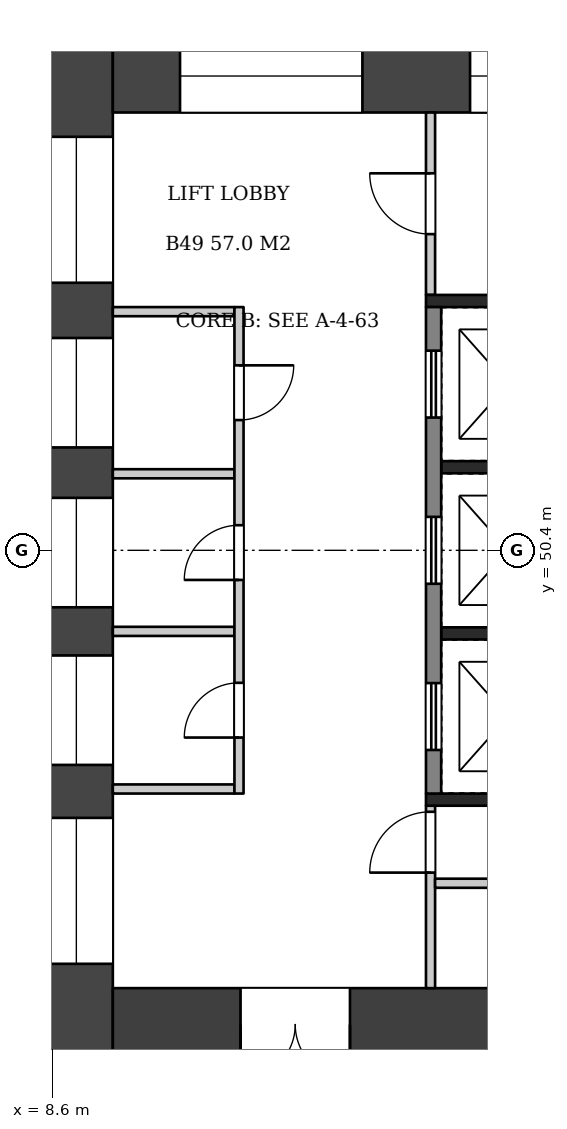
"""IFC4 building model, lengths in metres.
Left out: names, types, materials, properties, quantities, classifications, styles, units other than length and angle.
Written with IfcOpenShell. Run it as: python <this file> out.ifc"""

import sys

from ifc_helpers import new_model, si_unit, direction, frame, frame_2d, origin, place, context, subcontext, project, spatial, rectangle, extrude, element, fill, save


model = new_model("IFC4")
c1 = context("Model", 3, precision=1e-05, world=origin(), true_north=direction((0.0, 1.0)))
c2 = subcontext(c1, "Body", "Model", "MODEL_VIEW")
j1 = project(units=[si_unit("LENGTHUNIT", "METRE"), si_unit("PLANEANGLEUNIT", "RADIAN")], contexts=[c1])
p1 = place(None, origin())
s1 = spatial("IfcSite", under=j1, at=p1, CompositionType="ELEMENT")
p2 = place(p1, origin())
s2 = spatial("IfcBuilding", under=s1, at=p2, CompositionType="ELEMENT")
p3 = place(p2, frame((0.0, 0.0, 189.7)))
s3 = spatial("IfcBuildingStorey", under=s2, at=p3, CompositionType="ELEMENT", Elevation=189.7)
p4 = place(p3, frame((9.0, 58.8, 0.0), z_axis=(0.0, 0.0, 1.0), x_axis=(0.0, -1.0, 0.0)))
e1 = element("IfcWall", 1, at=p4, inside=s3, PredefinedType="SHEAR", context=c2, shape_type="SweptSolid", body=[
    extrude(rectangle(XDim=16.8, YDim=1.2, at=frame_2d((8.4, 0.0))), origin(), (0.0, 0.0, 1.0), 3.22),
])
p5 = place(p4, frame((1.6, 0.0, 0.6)))
e2 = element("IfcOpeningElement", 2, at=p5, cuts=e1, PredefinedType="OPENING", context=c2, shape_type="SweptSolid", body=[
    extrude(rectangle(XDim=2.4, YDim=2.1, at=frame_2d((1.2, 1.05))), frame((0.0, 0.61, 0.0), z_axis=(0.0, -1.0, 0.0), x_axis=(1.0, 0.0, 0.0)), (0.0, 0.0, 1.0), 1.22),
])
p6 = place(p4, frame((4.908, 0.0, 1.6)))
e3 = element("IfcOpeningElement", 3, at=p6, cuts=e1, PredefinedType="OPENING", context=c2, shape_type="SweptSolid", body=[
    extrude(rectangle(XDim=1.8, YDim=1.2, at=frame_2d((0.9, 0.6))), frame((0.0, 0.61, 0.0), z_axis=(0.0, -1.0, 0.0), x_axis=(1.0, 0.0, 0.0)), (0.0, 0.0, 1.0), 1.22),
])
p7 = place(p4, frame((7.537, 0.0, 1.6)))
e4 = element("IfcOpeningElement", 4, at=p7, cuts=e1, PredefinedType="OPENING", context=c2, shape_type="SweptSolid", body=[
    extrude(rectangle(XDim=1.8, YDim=1.2, at=frame_2d((0.9, 0.6))), frame((0.0, 0.61, 0.0), z_axis=(0.0, -1.0, 0.0), x_axis=(1.0, 0.0, 0.0)), (0.0, 0.0, 1.0), 1.22),
])
p8 = place(p4, frame((10.129, 0.0, 1.6)))
e5 = element("IfcOpeningElement", 5, at=p8, cuts=e1, PredefinedType="OPENING", context=c2, shape_type="SweptSolid", body=[
    extrude(rectangle(XDim=1.8, YDim=1.2, at=frame_2d((0.9, 0.6))), frame((0.0, 0.61, 0.0), z_axis=(0.0, -1.0, 0.0), x_axis=(1.0, 0.0, 0.0)), (0.0, 0.0, 1.0), 1.22),
])
p9 = place(p4, frame((12.8, 0.0, 0.6)))
e6 = element("IfcOpeningElement", 6, at=p9, cuts=e1, PredefinedType="OPENING", context=c2, shape_type="SweptSolid", body=[
    extrude(rectangle(XDim=2.4, YDim=2.1, at=frame_2d((1.2, 1.05))), frame((0.0, 0.61, 0.0), z_axis=(0.0, -1.0, 0.0), x_axis=(1.0, 0.0, 0.0)), (0.0, 0.0, 1.0), 1.22),
])
p10 = place(p3, frame((9.6, 58.2, 0.0), z_axis=(0.0, 0.0, 1.0), x_axis=(1.0, 0.0, 0.0)))
e7 = element("IfcWall", 7, at=p10, inside=s3, PredefinedType="SHEAR", context=c2, shape_type="SweptSolid", body=[
    extrude(rectangle(XDim=14.4, YDim=1.2, at=frame_2d((7.2, 0.0))), origin(), (0.0, 0.0, 1.0), 3.22),
])
p11 = place(p10, frame((1.105, 0.0, 0.6)))
e8 = element("IfcOpeningElement", 8, at=p11, cuts=e7, PredefinedType="OPENING", context=c2, shape_type="SweptSolid", body=[
    extrude(rectangle(XDim=3.0, YDim=2.1, at=frame_2d((1.5, 1.05))), frame((0.0, 0.61, 0.0), z_axis=(0.0, -1.0, 0.0), x_axis=(1.0, 0.0, 0.0)), (0.0, 0.0, 1.0), 1.22),
])
p12 = place(p10, frame((5.875, 0.0, 0.6)))
e9 = element("IfcOpeningElement", 9, at=p12, cuts=e7, PredefinedType="OPENING", context=c2, shape_type="SweptSolid", body=[
    extrude(rectangle(XDim=2.4, YDim=2.1, at=frame_2d((1.2, 1.05))), frame((0.0, 0.61, 0.0), z_axis=(0.0, -1.0, 0.0), x_axis=(1.0, 0.0, 0.0)), (0.0, 0.0, 1.0), 1.22),
])
p13 = place(p10, frame((9.993, 0.0, 0.5)))
e10 = element("IfcOpeningElement", 10, at=p13, cuts=e7, PredefinedType="OPENING", context=c2, shape_type="SweptSolid", body=[
    extrude(rectangle(XDim=1.2, YDim=2.4, at=frame_2d((0.6, 1.2))), frame((0.0, 0.61, 0.0), z_axis=(0.0, -1.0, 0.0), x_axis=(1.0, 0.0, 0.0)), (0.0, 0.0, 1.0), 1.22),
])
p14 = place(p10, frame((12.197, 0.0, 0.5)))
e11 = element("IfcOpeningElement", 11, at=p14, cuts=e7, PredefinedType="OPENING", context=c2, shape_type="SweptSolid", body=[
    extrude(rectangle(XDim=1.2, YDim=2.4, at=frame_2d((0.6, 1.2))), frame((0.0, 0.61, 0.0), z_axis=(0.0, -1.0, 0.0), x_axis=(1.0, 0.0, 0.0)), (0.0, 0.0, 1.0), 1.22),
])
p15 = place(p3, frame((9.6, 42.6, 0.0), z_axis=(0.0, 0.0, 1.0), x_axis=(1.0, 0.0, 0.0)))
e12 = element("IfcWall", 12, at=p15, inside=s3, PredefinedType="SHEAR", context=c2, shape_type="SweptSolid", body=[
    extrude(rectangle(XDim=14.4, YDim=1.2, at=frame_2d((7.2, 0.0))), origin(), (0.0, 0.0, 1.0), 3.22),
])
p16 = place(p15, frame((2.1, 0.0, 0.0)))
e13 = element("IfcOpeningElement", 13, at=p16, cuts=e12, PredefinedType="OPENING", context=c2, shape_type="SweptSolid", body=[
    extrude(rectangle(XDim=1.8, YDim=2.1, at=frame_2d((0.9, 1.05))), frame((0.0, 0.61, 0.0), z_axis=(0.0, -1.0, 0.0), x_axis=(1.0, 0.0, 0.0)), (0.0, 0.0, 1.0), 1.22),
])
for number, where, z_axis, x_axis in (
    (14, (9.6, 54.325, 0.0), (0.0, 0.0, 1.0), (1.0, 0.0, 0.0)),
    (15, (9.6, 46.475, 0.0), (0.0, 0.0, 1.0), (1.0, 0.0, 0.0)),
    (16, (9.6, 51.659, 0.0), (0.0, 0.0, 1.0), (1.0, 0.0, 0.0)),
    (17, (9.6, 49.067, 0.0), (0.0, 0.0, 1.0), (1.0, 0.0, 0.0)),
):
    element("IfcWall", number, at=place(p3, frame(where, z_axis=z_axis, x_axis=x_axis)), inside=s3, PredefinedType="PARTITIONING", context=c2, shape_type="SweptSolid", body=[
        extrude(rectangle(XDim=2.0, YDim=0.15, at=frame_2d((1.0, 0.0))), origin(), (0.0, 0.0, 1.0), 3.22),
    ])
p17 = place(p3, frame((11.675, 54.4, 0.0), z_axis=(0.0, 0.0, 1.0), x_axis=(0.0, -1.0, 0.0)))
e18 = element("IfcWall", 18, at=p17, inside=s3, PredefinedType="PARTITIONING", context=c2, shape_type="SweptSolid", body=[
    extrude(rectangle(XDim=8.0, YDim=0.15, at=frame_2d((4.0, 0.0))), origin(), (0.0, 0.0, 1.0), 3.22),
])
p18 = place(p17, frame((0.958, 0.0, 0.0)))
e19 = element("IfcOpeningElement", 19, at=p18, cuts=e18, PredefinedType="OPENING", context=c2, shape_type="SweptSolid", body=[
    extrude(rectangle(XDim=0.9, YDim=2.1, at=frame_2d((0.45, 1.05))), frame((0.0, 0.085, 0.0), z_axis=(0.0, -1.0, 0.0), x_axis=(1.0, 0.0, 0.0)), (0.0, 0.0, 1.0), 0.17),
])
p19 = place(p17, frame((3.587, 0.0, 0.0)))
e20 = element("IfcOpeningElement", 20, at=p19, cuts=e18, PredefinedType="OPENING", context=c2, shape_type="SweptSolid", body=[
    extrude(rectangle(XDim=0.9, YDim=2.1, at=frame_2d((0.45, 1.05))), frame((0.0, 0.085, 0.0), z_axis=(0.0, -1.0, 0.0), x_axis=(1.0, 0.0, 0.0)), (0.0, 0.0, 1.0), 0.17),
])
p20 = place(p17, frame((6.179, 0.0, 0.0)))
e21 = element("IfcOpeningElement", 21, at=p20, cuts=e18, PredefinedType="OPENING", context=c2, shape_type="SweptSolid", body=[
    extrude(rectangle(XDim=0.9, YDim=2.1, at=frame_2d((0.45, 1.05))), frame((0.0, 0.085, 0.0), z_axis=(0.0, -1.0, 0.0), x_axis=(1.0, 0.0, 0.0)), (0.0, 0.0, 1.0), 0.17),
])
for number, where, z_axis, x_axis in (
    (22, (15.0, 51.767, 0.0), (0.0, 0.0, 1.0), (1.0, 0.0, 0.0)),
    (23, (15.0, 49.033, 0.0), (0.0, 0.0, 1.0), (1.0, 0.0, 0.0)),
):
    element("IfcWall", number, at=place(p3, frame(where, z_axis=z_axis, x_axis=x_axis)), inside=s3, PredefinedType="SHEAR", context=c2, shape_type="SweptSolid", body=[
        extrude(rectangle(XDim=1.9, YDim=0.2, at=frame_2d((0.95, 0.0))), origin(), (0.0, 0.0, 1.0), 3.22),
    ])
p21 = place(p3, frame((14.875, 54.4, 0.0), z_axis=(0.0, 0.0, 1.0), x_axis=(0.0, -1.0, 0.0)))
e24 = element("IfcWall", 24, at=p21, inside=s3, PredefinedType="SHEAR", context=c2, shape_type="SweptSolid", body=[
    extrude(rectangle(XDim=8.0, YDim=0.25, at=frame_2d((4.0, 0.0))), origin(), (0.0, 0.0, 1.0), 3.22),
])
p22 = place(p21, frame((0.717, 0.0, 0.0)))
e25 = element("IfcOpeningElement", 25, at=p22, cuts=e24, PredefinedType="OPENING", context=c2, shape_type="SweptSolid", body=[
    extrude(rectangle(XDim=1.1, YDim=2.1, at=frame_2d((0.55, 1.05))), frame((0.0, 0.135, 0.0), z_axis=(0.0, -1.0, 0.0), x_axis=(1.0, 0.0, 0.0)), (0.0, 0.0, 1.0), 0.27),
])
p23 = place(p21, frame((3.45, 0.0, 0.0)))
e26 = element("IfcOpeningElement", 26, at=p23, cuts=e24, PredefinedType="OPENING", context=c2, shape_type="SweptSolid", body=[
    extrude(rectangle(XDim=1.1, YDim=2.1, at=frame_2d((0.55, 1.05))), frame((0.0, 0.135, 0.0), z_axis=(0.0, -1.0, 0.0), x_axis=(1.0, 0.0, 0.0)), (0.0, 0.0, 1.0), 0.27),
])
p24 = place(p21, frame((6.183, 0.0, 0.0)))
e27 = element("IfcOpeningElement", 27, at=p24, cuts=e24, PredefinedType="OPENING", context=c2, shape_type="SweptSolid", body=[
    extrude(rectangle(XDim=1.1, YDim=2.1, at=frame_2d((0.55, 1.05))), frame((0.0, 0.135, 0.0), z_axis=(0.0, -1.0, 0.0), x_axis=(1.0, 0.0, 0.0)), (0.0, 0.0, 1.0), 0.27),
])
p25 = place(p3, frame((14.75, 54.5, 0.0), z_axis=(0.0, 0.0, 1.0), x_axis=(1.0, 0.0, 0.0)))
e28 = element("IfcWall", 28, at=p25, inside=s3, PredefinedType="SHEAR", context=c2, shape_type="SweptSolid", body=[
    extrude(rectangle(XDim=2.4, YDim=0.2, at=frame_2d((1.2, 0.0))), origin(), (0.0, 0.0, 1.0), 3.22),
])
p26 = place(p3, frame((14.825, 57.6, 0.0), z_axis=(0.0, 0.0, 1.0), x_axis=(0.0, -1.0, 0.0)))
e29 = element("IfcWall", 29, at=p26, inside=s3, PredefinedType="PARTITIONING", context=c2, shape_type="SweptSolid", body=[
    extrude(rectangle(XDim=3.0, YDim=0.15, at=frame_2d((1.5, 0.0))), origin(), (0.0, 0.0, 1.0), 3.22),
])
p27 = place(p26, frame((1.0, 0.0, 0.0)))
e30 = element("IfcOpeningElement", 30, at=p27, cuts=e29, PredefinedType="OPENING", context=c2, shape_type="SweptSolid", body=[
    extrude(rectangle(XDim=1.0, YDim=2.1, at=frame_2d((0.5, 1.05))), frame((0.0, 0.085, 0.0), z_axis=(0.0, -1.0, 0.0), x_axis=(1.0, 0.0, 0.0)), (0.0, 0.0, 1.0), 0.17),
])
p28 = place(p3, frame((14.75, 46.3, 0.0), z_axis=(0.0, 0.0, 1.0), x_axis=(1.0, 0.0, 0.0)))
e31 = element("IfcWall", 31, at=p28, inside=s3, PredefinedType="SHEAR", context=c2, shape_type="SweptSolid", body=[
    extrude(rectangle(XDim=9.25, YDim=0.2, at=frame_2d((4.625, 0.0))), origin(), (0.0, 0.0, 1.0), 3.22),
])
p29 = place(p3, frame((14.825, 46.2, 0.0), z_axis=(0.0, 0.0, 1.0), x_axis=(0.0, -1.0, 0.0)))
e32 = element("IfcWall", 32, at=p29, inside=s3, PredefinedType="PARTITIONING", context=c2, shape_type="SweptSolid", body=[
    extrude(rectangle(XDim=3.0, YDim=0.15, at=frame_2d((1.5, 0.0))), origin(), (0.0, 0.0, 1.0), 3.22),
])
p30 = place(p29, frame((0.1, 0.0, 0.0)))
e33 = element("IfcOpeningElement", 33, at=p30, cuts=e32, PredefinedType="OPENING", context=c2, shape_type="SweptSolid", body=[
    extrude(rectangle(XDim=1.0, YDim=2.1, at=frame_2d((0.5, 1.05))), frame((0.0, 0.085, 0.0), z_axis=(0.0, -1.0, 0.0), x_axis=(1.0, 0.0, 0.0)), (0.0, 0.0, 1.0), 0.17),
])
p31 = place(p3, frame((14.9, 44.925, 0.0), z_axis=(0.0, 0.0, 1.0), x_axis=(1.0, 0.0, 0.0)))
e34 = element("IfcWall", 34, at=p31, inside=s3, PredefinedType="PARTITIONING", context=c2, shape_type="SweptSolid", body=[
    extrude(rectangle(XDim=9.1, YDim=0.15, at=frame_2d((4.55, 0.0))), origin(), (0.0, 0.0, 1.0), 3.22),
])
p32 = place(p31, frame((1.04, 0.0, 0.0)))
e35 = element("IfcOpeningElement", 35, at=p32, cuts=e34, PredefinedType="OPENING", context=c2, shape_type="SweptSolid", body=[
    extrude(rectangle(XDim=1.0, YDim=2.1, at=frame_2d((0.5, 1.05))), frame((0.0, 0.085, 0.0), z_axis=(0.0, -1.0, 0.0), x_axis=(1.0, 0.0, 0.0)), (0.0, 0.0, 1.0), 0.17),
])
p33 = place(p31, frame((4.32, 0.0, 0.0)))
e36 = element("IfcOpeningElement", 36, at=p33, cuts=e34, PredefinedType="OPENING", context=c2, shape_type="SweptSolid", body=[
    extrude(rectangle(XDim=0.9, YDim=2.1, at=frame_2d((0.45, 1.05))), frame((0.0, 0.085, 0.0), z_axis=(0.0, -1.0, 0.0), x_axis=(1.0, 0.0, 0.0)), (0.0, 0.0, 1.0), 0.17),
])
p34 = place(p31, frame((7.33, 0.0, 0.0)))
e37 = element("IfcOpeningElement", 37, at=p34, cuts=e34, PredefinedType="OPENING", context=c2, shape_type="SweptSolid", body=[
    extrude(rectangle(XDim=0.9, YDim=2.1, at=frame_2d((0.45, 1.05))), frame((0.0, 0.085, 0.0), z_axis=(0.0, -1.0, 0.0), x_axis=(1.0, 0.0, 0.0)), (0.0, 0.0, 1.0), 0.17),
])
p35 = place(p16, frame((1.8, 0.0, 0.0), z_axis=(0.0, 0.0, 1.0), x_axis=(-1.0, 0.0, 0.0)))
e38 = element("IfcDoor", 38, at=p35, inside=s3, OperationType="DOUBLE_DOOR_SINGLE_SWING", PredefinedType="DOOR", context=c2, shape_type="SweptSolid", body=[
    extrude(rectangle(XDim=1.8, YDim=2.1, at=frame_2d((0.9, 1.05))), frame((0.0, 0.025, 0.0), z_axis=(0.0, -1.0, 0.0), x_axis=(1.0, 0.0, 0.0)), (0.0, 0.0, 1.0), 0.05),
])
fill(e13, e38)
p36 = place(p18, origin())
e39 = element("IfcDoor", 39, at=p36, inside=s3, OperationType="SINGLE_SWING_LEFT", PredefinedType="DOOR", context=c2, shape_type="SweptSolid", body=[
    extrude(rectangle(XDim=0.9, YDim=2.1, at=frame_2d((0.45, 1.05))), frame((0.0, 0.025, 0.0), z_axis=(0.0, -1.0, 0.0), x_axis=(1.0, 0.0, 0.0)), (0.0, 0.0, 1.0), 0.05),
])
fill(e19, e39)
p37 = place(p19, frame((0.9, 0.0, 0.0), z_axis=(0.0, 0.0, 1.0), x_axis=(-1.0, 0.0, 0.0)))
e40 = element("IfcDoor", 40, at=p37, inside=s3, OperationType="SINGLE_SWING_LEFT", PredefinedType="DOOR", context=c2, shape_type="SweptSolid", body=[
    extrude(rectangle(XDim=0.9, YDim=2.1, at=frame_2d((0.45, 1.05))), frame((0.0, 0.025, 0.0), z_axis=(0.0, -1.0, 0.0), x_axis=(1.0, 0.0, 0.0)), (0.0, 0.0, 1.0), 0.05),
])
fill(e20, e40)
p38 = place(p20, frame((0.9, 0.0, 0.0), z_axis=(0.0, 0.0, 1.0), x_axis=(-1.0, 0.0, 0.0)))
e41 = element("IfcDoor", 41, at=p38, inside=s3, OperationType="SINGLE_SWING_LEFT", PredefinedType="DOOR", context=c2, shape_type="SweptSolid", body=[
    extrude(rectangle(XDim=0.9, YDim=2.1, at=frame_2d((0.45, 1.05))), frame((0.0, 0.025, 0.0), z_axis=(0.0, -1.0, 0.0), x_axis=(1.0, 0.0, 0.0)), (0.0, 0.0, 1.0), 0.05),
])
fill(e21, e41)
p39 = place(p22, origin())
e42 = element("IfcDoor", 42, at=p39, inside=s3, OperationType="DOUBLE_DOOR_SLIDING", PredefinedType="DOOR", context=c2, shape_type="SweptSolid", body=[
    extrude(rectangle(XDim=1.1, YDim=2.1, at=frame_2d((0.55, 1.05))), frame((0.0, 0.025, 0.0), z_axis=(0.0, -1.0, 0.0), x_axis=(1.0, 0.0, 0.0)), (0.0, 0.0, 1.0), 0.05),
])
fill(e25, e42)
p40 = place(p23, origin())
e43 = element("IfcDoor", 43, at=p40, inside=s3, OperationType="DOUBLE_DOOR_SLIDING", PredefinedType="DOOR", context=c2, shape_type="SweptSolid", body=[
    extrude(rectangle(XDim=1.1, YDim=2.1, at=frame_2d((0.55, 1.05))), frame((0.0, 0.025, 0.0), z_axis=(0.0, -1.0, 0.0), x_axis=(1.0, 0.0, 0.0)), (0.0, 0.0, 1.0), 0.05),
])
fill(e26, e43)
p41 = place(p24, origin())
e44 = element("IfcDoor", 44, at=p41, inside=s3, OperationType="DOUBLE_DOOR_SLIDING", PredefinedType="DOOR", context=c2, shape_type="SweptSolid", body=[
    extrude(rectangle(XDim=1.1, YDim=2.1, at=frame_2d((0.55, 1.05))), frame((0.0, 0.025, 0.0), z_axis=(0.0, -1.0, 0.0), x_axis=(1.0, 0.0, 0.0)), (0.0, 0.0, 1.0), 0.05),
])
fill(e27, e44)
p42 = place(p27, frame((1.0, 0.0, 0.0), z_axis=(0.0, 0.0, 1.0), x_axis=(-1.0, 0.0, 0.0)))
e45 = element("IfcDoor", 45, at=p42, inside=s3, OperationType="SINGLE_SWING_RIGHT", PredefinedType="DOOR", context=c2, shape_type="SweptSolid", body=[
    extrude(rectangle(XDim=1.0, YDim=2.1, at=frame_2d((0.5, 1.05))), frame((0.0, 0.025, 0.0), z_axis=(0.0, -1.0, 0.0), x_axis=(1.0, 0.0, 0.0)), (0.0, 0.0, 1.0), 0.05),
])
fill(e30, e45)
p43 = place(p30, frame((1.0, 0.0, 0.0), z_axis=(0.0, 0.0, 1.0), x_axis=(-1.0, 0.0, 0.0)))
e46 = element("IfcDoor", 46, at=p43, inside=s3, OperationType="SINGLE_SWING_LEFT", PredefinedType="DOOR", context=c2, shape_type="SweptSolid", body=[
    extrude(rectangle(XDim=1.0, YDim=2.1, at=frame_2d((0.5, 1.05))), frame((0.0, 0.025, 0.0), z_axis=(0.0, -1.0, 0.0), x_axis=(1.0, 0.0, 0.0)), (0.0, 0.0, 1.0), 0.05),
])
fill(e33, e46)
p44 = place(p5, origin())
e47 = element("IfcWindow", 47, at=p44, inside=s3, PartitioningType="SINGLE_PANEL", PredefinedType="WINDOW", context=c2, shape_type="SweptSolid", body=[
    extrude(rectangle(XDim=2.4, YDim=2.1, at=frame_2d((1.2, 1.05))), frame((0.0, 0.03, 0.0), z_axis=(0.0, -1.0, 0.0), x_axis=(1.0, 0.0, 0.0)), (0.0, 0.0, 1.0), 0.06),
])
fill(e2, e47)
p45 = place(p6, origin())
e48 = element("IfcWindow", 48, at=p45, inside=s3, PartitioningType="SINGLE_PANEL", PredefinedType="WINDOW", context=c2, shape_type="SweptSolid", body=[
    extrude(rectangle(XDim=1.8, YDim=1.2, at=frame_2d((0.9, 0.6))), frame((0.0, 0.03, 0.0), z_axis=(0.0, -1.0, 0.0), x_axis=(1.0, 0.0, 0.0)), (0.0, 0.0, 1.0), 0.06),
])
fill(e3, e48)
p46 = place(p7, origin())
e49 = element("IfcWindow", 49, at=p46, inside=s3, PartitioningType="SINGLE_PANEL", PredefinedType="WINDOW", context=c2, shape_type="SweptSolid", body=[
    extrude(rectangle(XDim=1.8, YDim=1.2, at=frame_2d((0.9, 0.6))), frame((0.0, 0.03, 0.0), z_axis=(0.0, -1.0, 0.0), x_axis=(1.0, 0.0, 0.0)), (0.0, 0.0, 1.0), 0.06),
])
fill(e4, e49)
p47 = place(p8, origin())
e50 = element("IfcWindow", 50, at=p47, inside=s3, PartitioningType="SINGLE_PANEL", PredefinedType="WINDOW", context=c2, shape_type="SweptSolid", body=[
    extrude(rectangle(XDim=1.8, YDim=1.2, at=frame_2d((0.9, 0.6))), frame((0.0, 0.03, 0.0), z_axis=(0.0, -1.0, 0.0), x_axis=(1.0, 0.0, 0.0)), (0.0, 0.0, 1.0), 0.06),
])
fill(e5, e50)
p48 = place(p9, origin())
e51 = element("IfcWindow", 51, at=p48, inside=s3, PartitioningType="SINGLE_PANEL", PredefinedType="WINDOW", context=c2, shape_type="SweptSolid", body=[
    extrude(rectangle(XDim=2.4, YDim=2.1, at=frame_2d((1.2, 1.05))), frame((0.0, 0.03, 0.0), z_axis=(0.0, -1.0, 0.0), x_axis=(1.0, 0.0, 0.0)), (0.0, 0.0, 1.0), 0.06),
])
fill(e6, e51)
p49 = place(p11, origin())
e52 = element("IfcWindow", 52, at=p49, inside=s3, PartitioningType="SINGLE_PANEL", PredefinedType="WINDOW", context=c2, shape_type="SweptSolid", body=[
    extrude(rectangle(XDim=3.0, YDim=2.1, at=frame_2d((1.5, 1.05))), frame((0.0, 0.03, 0.0), z_axis=(0.0, -1.0, 0.0), x_axis=(1.0, 0.0, 0.0)), (0.0, 0.0, 1.0), 0.06),
])
fill(e8, e52)
p50 = place(p12, origin())
e53 = element("IfcWindow", 53, at=p50, inside=s3, PartitioningType="SINGLE_PANEL", PredefinedType="WINDOW", context=c2, shape_type="SweptSolid", body=[
    extrude(rectangle(XDim=2.4, YDim=2.1, at=frame_2d((1.2, 1.05))), frame((0.0, 0.03, 0.0), z_axis=(0.0, -1.0, 0.0), x_axis=(1.0, 0.0, 0.0)), (0.0, 0.0, 1.0), 0.06),
])
fill(e9, e53)
save(model, sys.argv[1])
